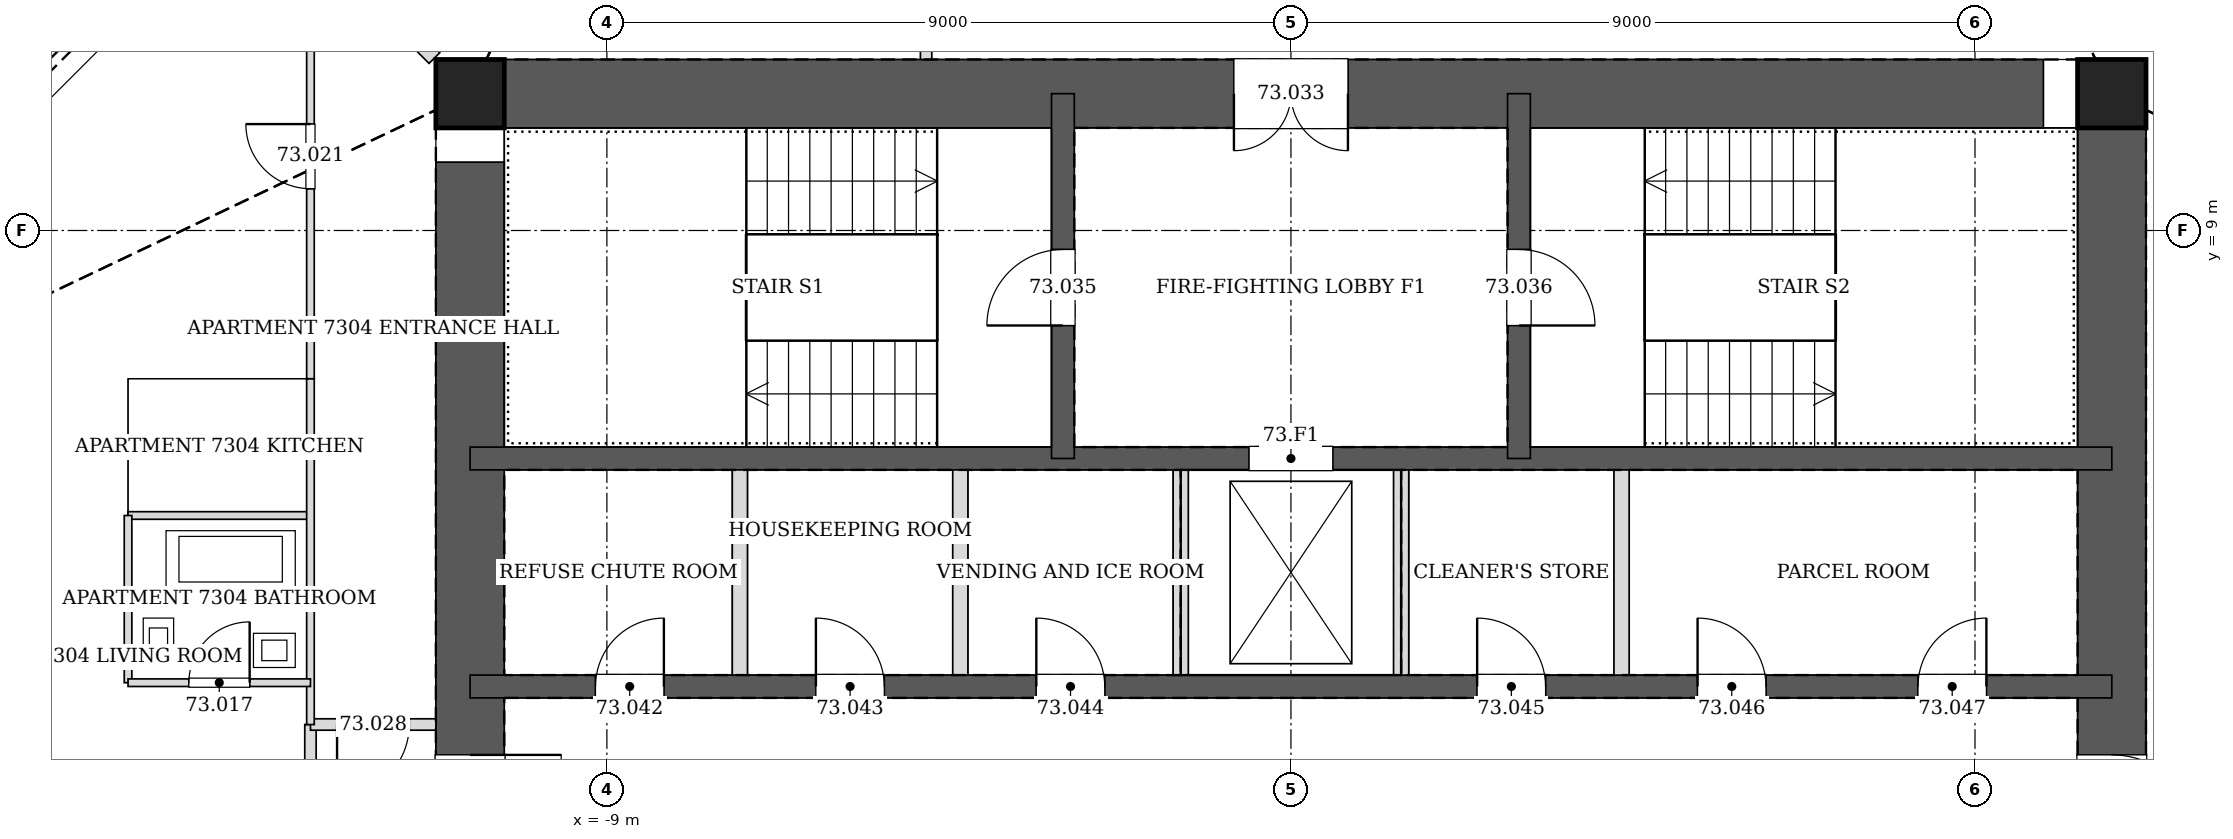
"""IFC4 building model, lengths in metres.
Left out: names, types, materials, properties, quantities, classifications, styles, units other than length and angle.
Written with IfcOpenShell. Run it as: python <this file> out.ifc"""

import sys

from ifc_helpers import new_model, si_unit, direction, frame, frame_2d, origin, origin_2d, place, context, subcontext, project, spatial, rectangle, hollow_rectangle, extrude, element, fill, save


model = new_model("IFC4")
c1 = context("Model", 3, precision=1e-05, world=origin(), true_north=direction((0.0, 1.0)))
c2 = subcontext(c1, "Body", "Model", "MODEL_VIEW")
j1 = project(units=[si_unit("LENGTHUNIT", "METRE"), si_unit("PLANEANGLEUNIT", "RADIAN")], contexts=[c1])
p1 = place(None, origin())
s1 = spatial("IfcSite", under=j1, at=p1, CompositionType="ELEMENT")
p2 = place(p1, origin())
s2 = spatial("IfcBuilding", under=s1, at=p2, CompositionType="ELEMENT")
p3 = place(p2, frame((0.0, 0.0, 298.0)))
s3 = spatial("IfcBuildingStorey", under=s2, at=p3, CompositionType="ELEMENT", Elevation=298.0)
for number, where, z_axis, x_axis in (
    (1, (10.8, 10.8, 0.0), (0.0, 0.0, 1.0), (1.0, 0.0, 0.0)),
    (2, (-10.8, 10.8, 0.0), (0.0, 0.0, 1.0), (1.0, 0.0, 0.0)),
):
    element("IfcColumn", number, at=place(p3, frame(where, z_axis=z_axis, x_axis=x_axis)), inside=s3, PredefinedType="COLUMN", context=c2, shape_type="SweptSolid", body=[
        extrude(hollow_rectangle(XDim=0.9, YDim=0.9, WallThickness=0.04, at=origin_2d()), origin(), (0.0, 0.0, 1.0), 3.4),
    ])
p4 = place(p3, frame((10.8, -10.8, 0.0), z_axis=(0.0, 0.0, 1.0), x_axis=(0.0, 1.0, 0.0)))
e3 = element("IfcWall", 3, at=p4, inside=s3, PredefinedType="SOLIDWALL", context=c2, shape_type="SweptSolid", body=[
    extrude(rectangle(XDim=21.6, YDim=0.9, at=frame_2d((10.8, 0.0))), origin(), (0.0, 0.0, 1.0), 3.4),
])
p5 = place(p4, frame((11.7, 0.0, 0.0)))
e4 = element("IfcOpeningElement", 4, at=p5, cuts=e3, PredefinedType="OPENING", context=c2, shape_type="SweptSolid", body=[
    extrude(rectangle(XDim=1.2, YDim=2.1, at=frame_2d((0.6, 1.05))), frame((0.0, 0.46, 0.0), z_axis=(0.0, -1.0, 0.0), x_axis=(1.0, 0.0, 0.0)), (0.0, 0.0, 1.0), 0.92),
])
p6 = place(p4, frame((8.7, 0.0, 0.0)))
e5 = element("IfcOpeningElement", 5, at=p6, cuts=e3, PredefinedType="OPENING", context=c2, shape_type="SweptSolid", body=[
    extrude(rectangle(XDim=1.2, YDim=2.1, at=frame_2d((0.6, 1.05))), frame((0.0, 0.46, 0.0), z_axis=(0.0, -1.0, 0.0), x_axis=(1.0, 0.0, 0.0)), (0.0, 0.0, 1.0), 0.92),
])
p7 = place(p3, frame((10.8, 10.8, 0.0), z_axis=(0.0, 0.0, 1.0), x_axis=(-1.0, 0.0, 0.0)))
e6 = element("IfcWall", 6, at=p7, inside=s3, PredefinedType="SOLIDWALL", context=c2, shape_type="SweptSolid", body=[
    extrude(rectangle(XDim=21.6, YDim=0.9, at=frame_2d((10.8, 0.0))), origin(), (0.0, 0.0, 1.0), 3.4),
])
p8 = place(p7, frame((10.05, 0.0, 0.0)))
e7 = element("IfcOpeningElement", 7, at=p8, cuts=e6, PredefinedType="OPENING", context=c2, shape_type="SweptSolid", body=[
    extrude(rectangle(XDim=1.5, YDim=2.1, at=frame_2d((0.75, 1.05))), frame((0.0, 0.46, 0.0), z_axis=(0.0, -1.0, 0.0), x_axis=(1.0, 0.0, 0.0)), (0.0, 0.0, 1.0), 0.92),
])
p9 = place(p3, frame((-10.8, 10.8, 0.0), z_axis=(0.0, 0.0, 1.0), x_axis=(0.0, -1.0, 0.0)))
e8 = element("IfcWall", 8, at=p9, inside=s3, PredefinedType="SOLIDWALL", context=c2, shape_type="SweptSolid", body=[
    extrude(rectangle(XDim=21.6, YDim=0.9, at=frame_2d((10.8, 0.0))), origin(), (0.0, 0.0, 1.0), 3.4),
])
p10 = place(p9, frame((8.7, 0.0, 0.0)))
e9 = element("IfcOpeningElement", 9, at=p10, cuts=e8, PredefinedType="OPENING", context=c2, shape_type="SweptSolid", body=[
    extrude(rectangle(XDim=1.2, YDim=2.1, at=frame_2d((0.6, 1.05))), frame((0.0, 0.46, 0.0), z_axis=(0.0, -1.0, 0.0), x_axis=(1.0, 0.0, 0.0)), (0.0, 0.0, 1.0), 0.92),
])
p11 = place(p9, frame((11.7, 0.0, 0.0)))
e10 = element("IfcOpeningElement", 10, at=p11, cuts=e8, PredefinedType="OPENING", context=c2, shape_type="SweptSolid", body=[
    extrude(rectangle(XDim=1.2, YDim=2.1, at=frame_2d((0.6, 1.05))), frame((0.0, 0.46, 0.0), z_axis=(0.0, -1.0, 0.0), x_axis=(1.0, 0.0, 0.0)), (0.0, 0.0, 1.0), 0.92),
])
p12 = place(p3, frame((-10.8, 3.0, 0.0), z_axis=(0.0, 0.0, 1.0), x_axis=(1.0, 0.0, 0.0)))
e11 = element("IfcWall", 11, at=p12, inside=s3, PredefinedType="SOLIDWALL", context=c2, shape_type="SweptSolid", body=[
    extrude(rectangle(XDim=21.6, YDim=0.3, at=frame_2d((10.8, 0.0))), origin(), (0.0, 0.0, 1.0), 3.4),
])
p13 = place(p12, frame((1.65, 0.0, 0.0)))
e12 = element("IfcOpeningElement", 12, at=p13, cuts=e11, PredefinedType="OPENING", context=c2, shape_type="SweptSolid", body=[
    extrude(rectangle(XDim=0.9, YDim=2.1, at=frame_2d((0.45, 1.05))), frame((0.0, 0.16, 0.0), z_axis=(0.0, -1.0, 0.0), x_axis=(1.0, 0.0, 0.0)), (0.0, 0.0, 1.0), 0.32),
])
p14 = place(p12, frame((4.55, 0.0, 0.0)))
e13 = element("IfcOpeningElement", 13, at=p14, cuts=e11, PredefinedType="OPENING", context=c2, shape_type="SweptSolid", body=[
    extrude(rectangle(XDim=0.9, YDim=2.1, at=frame_2d((0.45, 1.05))), frame((0.0, 0.16, 0.0), z_axis=(0.0, -1.0, 0.0), x_axis=(1.0, 0.0, 0.0)), (0.0, 0.0, 1.0), 0.32),
])
p15 = place(p12, frame((7.45, 0.0, 0.0)))
e14 = element("IfcOpeningElement", 14, at=p15, cuts=e11, PredefinedType="OPENING", context=c2, shape_type="SweptSolid", body=[
    extrude(rectangle(XDim=0.9, YDim=2.1, at=frame_2d((0.45, 1.05))), frame((0.0, 0.16, 0.0), z_axis=(0.0, -1.0, 0.0), x_axis=(1.0, 0.0, 0.0)), (0.0, 0.0, 1.0), 0.32),
])
p16 = place(p12, frame((13.25, 0.0, 0.0)))
e15 = element("IfcOpeningElement", 15, at=p16, cuts=e11, PredefinedType="OPENING", context=c2, shape_type="SweptSolid", body=[
    extrude(rectangle(XDim=0.9, YDim=2.1, at=frame_2d((0.45, 1.05))), frame((0.0, 0.16, 0.0), z_axis=(0.0, -1.0, 0.0), x_axis=(1.0, 0.0, 0.0)), (0.0, 0.0, 1.0), 0.32),
])
p17 = place(p12, frame((16.15, 0.0, 0.0)))
e16 = element("IfcOpeningElement", 16, at=p17, cuts=e11, PredefinedType="OPENING", context=c2, shape_type="SweptSolid", body=[
    extrude(rectangle(XDim=0.9, YDim=2.1, at=frame_2d((0.45, 1.05))), frame((0.0, 0.16, 0.0), z_axis=(0.0, -1.0, 0.0), x_axis=(1.0, 0.0, 0.0)), (0.0, 0.0, 1.0), 0.32),
])
p18 = place(p12, frame((19.05, 0.0, 0.0)))
e17 = element("IfcOpeningElement", 17, at=p18, cuts=e11, PredefinedType="OPENING", context=c2, shape_type="SweptSolid", body=[
    extrude(rectangle(XDim=0.9, YDim=2.1, at=frame_2d((0.45, 1.05))), frame((0.0, 0.16, 0.0), z_axis=(0.0, -1.0, 0.0), x_axis=(1.0, 0.0, 0.0)), (0.0, 0.0, 1.0), 0.32),
])
p19 = place(p3, frame((-10.8, 6.0, 0.0), z_axis=(0.0, 0.0, 1.0), x_axis=(1.0, 0.0, 0.0)))
e18 = element("IfcWall", 18, at=p19, inside=s3, PredefinedType="SOLIDWALL", context=c2, shape_type="SweptSolid", body=[
    extrude(rectangle(XDim=21.6, YDim=0.3, at=frame_2d((10.8, 0.0))), origin(), (0.0, 0.0, 1.0), 3.4),
])
p20 = place(p19, frame((10.25, 0.0, 0.0)))
e19 = element("IfcOpeningElement", 19, at=p20, cuts=e18, PredefinedType="OPENING", context=c2, shape_type="SweptSolid", body=[
    extrude(rectangle(XDim=1.1, YDim=2.1, at=frame_2d((0.55, 1.05))), frame((0.0, 0.16, 0.0), z_axis=(0.0, -1.0, 0.0), x_axis=(1.0, 0.0, 0.0)), (0.0, 0.0, 1.0), 0.32),
])
p21 = place(p3, frame((-3.0, 6.0, 0.0), z_axis=(0.0, 0.0, 1.0), x_axis=(0.0, 1.0, 0.0)))
e20 = element("IfcWall", 20, at=p21, inside=s3, PredefinedType="SOLIDWALL", context=c2, shape_type="SweptSolid", body=[
    extrude(rectangle(XDim=4.8, YDim=0.3, at=frame_2d((2.4, 0.0))), origin(), (0.0, 0.0, 1.0), 3.4),
])
p22 = place(p21, frame((1.75, 0.0, 0.0)))
e21 = element("IfcOpeningElement", 21, at=p22, cuts=e20, PredefinedType="OPENING", context=c2, shape_type="SweptSolid", body=[
    extrude(rectangle(XDim=1.0, YDim=2.1, at=frame_2d((0.5, 1.05))), frame((0.0, 0.16, 0.0), z_axis=(0.0, -1.0, 0.0), x_axis=(1.0, 0.0, 0.0)), (0.0, 0.0, 1.0), 0.32),
])
p23 = place(p3, frame((3.0, 6.0, 0.0), z_axis=(0.0, 0.0, 1.0), x_axis=(0.0, 1.0, 0.0)))
e22 = element("IfcWall", 22, at=p23, inside=s3, PredefinedType="SOLIDWALL", context=c2, shape_type="SweptSolid", body=[
    extrude(rectangle(XDim=4.8, YDim=0.3, at=frame_2d((2.4, 0.0))), origin(), (0.0, 0.0, 1.0), 3.4),
])
p24 = place(p23, frame((1.75, 0.0, 0.0)))
e23 = element("IfcOpeningElement", 23, at=p24, cuts=e22, PredefinedType="OPENING", context=c2, shape_type="SweptSolid", body=[
    extrude(rectangle(XDim=1.0, YDim=2.1, at=frame_2d((0.5, 1.05))), frame((0.0, 0.16, 0.0), z_axis=(0.0, -1.0, 0.0), x_axis=(1.0, 0.0, 0.0)), (0.0, 0.0, 1.0), 0.32),
])
p25 = place(p3, frame((-4.8, 12.9, 0.0), z_axis=(0.0, 0.0, 1.0), x_axis=(0.0, -1.0, 0.0)))
e24 = element("IfcWall", 24, at=p25, inside=s3, PredefinedType="PARTITIONING", context=c2, shape_type="SweptSolid", body=[
    extrude(rectangle(XDim=1.65, YDim=0.15, at=frame_2d((0.825, 0.0))), origin(), (0.0, 0.0, 1.0), 3.2),
])
p26 = place(p3, frame((-12.9, 2.5, 0.0), z_axis=(0.0, 0.0, 1.0), x_axis=(0.0, -1.0, 0.0)))
e25 = element("IfcWall", 25, at=p26, inside=s3, PredefinedType="PARTITIONING", context=c2, shape_type="SweptSolid", body=[
    extrude(rectangle(XDim=9.251, YDim=0.15, at=frame_2d((4.625, 0.0))), origin(), (0.0, 0.0, 1.0), 2.349),
])
p27 = place(p3, frame((-11.25, 2.5, 0.0), z_axis=(0.0, 0.0, 1.0), x_axis=(-1.0, 0.0, 0.0)))
e26 = element("IfcWall", 26, at=p27, inside=s3, PredefinedType="PARTITIONING", context=c2, shape_type="SweptSolid", body=[
    extrude(rectangle(XDim=1.65, YDim=0.15, at=frame_2d((0.825, 0.0))), origin(), (0.0, 0.0, 1.0), 3.2),
])
p28 = place(p27, frame((0.35, 0.0, 0.0)))
e27 = element("IfcOpeningElement", 27, at=p28, cuts=e26, PredefinedType="OPENING", context=c2, shape_type="SweptSolid", body=[
    extrude(rectangle(XDim=0.95, YDim=2.1, at=frame_2d((0.475, 1.05))), frame((0.0, 0.085, 0.0), z_axis=(0.0, -1.0, 0.0), x_axis=(1.0, 0.0, 0.0)), (0.0, 0.0, 1.0), 0.17),
])
p29 = place(p3, frame((-12.901, 12.901, 0.0), z_axis=(0.0, 0.0, 1.0), x_axis=(0.707106781187, -0.707106781187, 0.0)))
e28 = element("IfcWall", 28, at=p29, inside=s3, PredefinedType="PARTITIONING", context=c2, shape_type="SweptSolid", body=[
    extrude(rectangle(XDim=2.308, YDim=0.2, at=frame_2d((1.154, 0.0))), origin(), (0.0, 0.0, 1.0), 2.591),
])
p30 = place(p3, frame((-15.3, 5.25, 0.0), z_axis=(0.0, 0.0, 1.0), x_axis=(1.0, 0.0, 0.0)))
e29 = element("IfcWall", 29, at=p30, inside=s3, PredefinedType="PARTITIONING", context=c2, shape_type="SweptSolid", body=[
    extrude(rectangle(XDim=2.4, YDim=0.1, at=frame_2d((1.2, 0.0))), origin(), (0.0, 0.0, 1.0), 2.662),
])
p31 = place(p3, frame((-12.9, 7.05, 0.0), z_axis=(0.0, 0.0, 1.0), x_axis=(0.0, -1.0, 0.0)))
e30 = element("IfcWall", 30, at=p31, inside=s3, PredefinedType="PARTITIONING", context=c2, shape_type="SweptSolid", body=[
    extrude(rectangle(XDim=4.551, YDim=0.1, at=frame_2d((2.275, 0.0))), origin(), (0.0, 0.0, 1.0), 3.2),
])
p32 = place(p3, frame((-15.3, 5.25, 0.0), z_axis=(0.0, 0.0, 1.0), x_axis=(0.0, -1.0, 0.0)))
e31 = element("IfcWall", 31, at=p32, inside=s3, PredefinedType="PARTITIONING", context=c2, shape_type="SweptSolid", body=[
    extrude(rectangle(XDim=2.2, YDim=0.1, at=frame_2d((1.1, 0.0))), origin(), (0.0, 0.0, 1.0), 3.2),
])
p33 = place(p3, frame((-15.3, 3.05, 0.0), z_axis=(0.0, 0.0, 1.0), x_axis=(1.0, 0.0, 0.0)))
e32 = element("IfcWall", 32, at=p33, inside=s3, PredefinedType="PARTITIONING", context=c2, shape_type="SweptSolid", body=[
    extrude(rectangle(XDim=2.4, YDim=0.1, at=frame_2d((1.2, 0.0))), origin(), (0.0, 0.0, 1.0), 2.662),
])
p34 = place(p33, frame((0.8, 0.0, 0.0)))
e33 = element("IfcOpeningElement", 33, at=p34, cuts=e32, PredefinedType="OPENING", context=c2, shape_type="SweptSolid", body=[
    extrude(rectangle(XDim=0.8, YDim=2.1, at=frame_2d((0.4, 1.05))), frame((0.0, 0.06, 0.0), z_axis=(0.0, -1.0, 0.0), x_axis=(1.0, 0.0, 0.0)), (0.0, 0.0, 1.0), 0.12),
])
p35 = place(p3, frame((-12.9, 7.05, 0.0), z_axis=(0.0, 0.0, 1.0), x_axis=(0.0, 1.0, 0.0)))
e34 = element("IfcWall", 34, at=p35, inside=s3, PredefinedType="PARTITIONING", context=c2, shape_type="SweptSolid", body=[
    extrude(rectangle(XDim=5.85, YDim=0.1, at=frame_2d((2.925, 0.0))), origin(), (0.0, 0.0, 1.0), 2.436),
])
p36 = place(p35, frame((2.5, 0.0, 0.0)))
e35 = element("IfcOpeningElement", 35, at=p36, cuts=e34, PredefinedType="OPENING", context=c2, shape_type="SweptSolid", body=[
    extrude(rectangle(XDim=0.85, YDim=2.1, at=frame_2d((0.425, 1.05))), frame((0.0, 0.06, 0.0), z_axis=(0.0, -1.0, 0.0), x_axis=(1.0, 0.0, 0.0)), (0.0, 0.0, 1.0), 0.12),
])
for number, where, z_axis, x_axis in (
    (36, (-7.25, 3.15, 0.0), (0.0, 0.0, 1.0), (0.0, 1.0, 0.0)),
    (37, (-4.35, 3.15, 0.0), (0.0, 0.0, 1.0), (0.0, 1.0, 0.0)),
    (38, (-1.45, 3.15, 0.0), (0.0, 0.0, 1.0), (0.0, 1.0, 0.0)),
    (39, (1.45, 3.15, 0.0), (0.0, 0.0, 1.0), (0.0, 1.0, 0.0)),
    (40, (4.35, 3.15, 0.0), (0.0, 0.0, 1.0), (0.0, 1.0, 0.0)),
):
    element("IfcWall", number, at=place(p3, frame(where, z_axis=z_axis, x_axis=x_axis)), inside=s3, PredefinedType="PARTITIONING", context=c2, shape_type="SweptSolid", body=[
        extrude(rectangle(XDim=2.7, YDim=0.2, at=frame_2d((1.35, 0.0))), origin(), (0.0, 0.0, 1.0), 3.2),
    ])
p37 = place(p34, origin())
e41 = element("IfcDoor", 41, at=p37, inside=s3, OperationType="SINGLE_SWING_RIGHT", PredefinedType="DOOR", context=c2, shape_type="SweptSolid", body=[
    extrude(rectangle(XDim=0.8, YDim=2.1, at=frame_2d((0.4, 1.05))), frame((0.0, 0.025, 0.0), z_axis=(0.0, -1.0, 0.0), x_axis=(1.0, 0.0, 0.0)), (0.0, 0.0, 1.0), 0.05),
])
fill(e33, e41)
p38 = place(p36, origin())
e42 = element("IfcDoor", 42, at=p38, inside=s3, OperationType="SINGLE_SWING_RIGHT", PredefinedType="DOOR", context=c2, shape_type="SweptSolid", body=[
    extrude(rectangle(XDim=0.85, YDim=2.1, at=frame_2d((0.425, 1.05))), frame((0.0, 0.025, 0.0), z_axis=(0.0, -1.0, 0.0), x_axis=(1.0, 0.0, 0.0)), (0.0, 0.0, 1.0), 0.05),
])
fill(e35, e42)
p39 = place(p28, origin())
e43 = element("IfcDoor", 43, at=p39, inside=s3, OperationType="SINGLE_SWING_RIGHT", PredefinedType="DOOR", context=c2, shape_type="SweptSolid", body=[
    extrude(rectangle(XDim=0.95, YDim=2.1, at=frame_2d((0.475, 1.05))), frame((0.0, 0.025, 0.0), z_axis=(0.0, -1.0, 0.0), x_axis=(1.0, 0.0, 0.0)), (0.0, 0.0, 1.0), 0.05),
])
fill(e27, e43)
p40 = place(p5, frame((1.2, 0.0, 0.0), z_axis=(0.0, 0.0, 1.0), x_axis=(-1.0, 0.0, 0.0)))
e44 = element("IfcDoor", 44, at=p40, inside=s3, OperationType="SINGLE_SWING_RIGHT", PredefinedType="DOOR", context=c2, shape_type="SweptSolid", body=[
    extrude(rectangle(XDim=1.2, YDim=2.1, at=frame_2d((0.6, 1.05))), frame((0.0, 0.025, 0.0), z_axis=(0.0, -1.0, 0.0), x_axis=(1.0, 0.0, 0.0)), (0.0, 0.0, 1.0), 0.05),
])
fill(e4, e44)
p41 = place(p10, origin())
e45 = element("IfcDoor", 45, at=p41, inside=s3, OperationType="SINGLE_SWING_LEFT", PredefinedType="DOOR", context=c2, shape_type="SweptSolid", body=[
    extrude(rectangle(XDim=1.2, YDim=2.1, at=frame_2d((0.6, 1.05))), frame((0.0, 0.025, 0.0), z_axis=(0.0, -1.0, 0.0), x_axis=(1.0, 0.0, 0.0)), (0.0, 0.0, 1.0), 0.05),
])
fill(e9, e45)
p42 = place(p8, origin())
e46 = element("IfcDoor", 46, at=p42, inside=s3, OperationType="DOUBLE_DOOR_SINGLE_SWING", PredefinedType="DOOR", context=c2, shape_type="SweptSolid", body=[
    extrude(rectangle(XDim=1.5, YDim=2.1, at=frame_2d((0.75, 1.05))), frame((0.0, 0.025, 0.0), z_axis=(0.0, -1.0, 0.0), x_axis=(1.0, 0.0, 0.0)), (0.0, 0.0, 1.0), 0.05),
])
fill(e7, e46)
p43 = place(p22, origin())
e47 = element("IfcDoor", 47, at=p43, inside=s3, OperationType="SINGLE_SWING_LEFT", PredefinedType="DOOR", context=c2, shape_type="SweptSolid", body=[
    extrude(rectangle(XDim=1.0, YDim=2.1, at=frame_2d((0.5, 1.05))), frame((0.0, 0.025, 0.0), z_axis=(0.0, -1.0, 0.0), x_axis=(1.0, 0.0, 0.0)), (0.0, 0.0, 1.0), 0.05),
])
fill(e21, e47)
p44 = place(p24, frame((1.0, 0.0, 0.0), z_axis=(0.0, 0.0, 1.0), x_axis=(-1.0, 0.0, 0.0)))
e48 = element("IfcDoor", 48, at=p44, inside=s3, OperationType="SINGLE_SWING_RIGHT", PredefinedType="DOOR", context=c2, shape_type="SweptSolid", body=[
    extrude(rectangle(XDim=1.0, YDim=2.1, at=frame_2d((0.5, 1.05))), frame((0.0, 0.025, 0.0), z_axis=(0.0, -1.0, 0.0), x_axis=(1.0, 0.0, 0.0)), (0.0, 0.0, 1.0), 0.05),
])
fill(e23, e48)
p45 = place(p13, origin())
e49 = element("IfcDoor", 49, at=p45, inside=s3, OperationType="SINGLE_SWING_RIGHT", PredefinedType="DOOR", context=c2, shape_type="SweptSolid", body=[
    extrude(rectangle(XDim=0.9, YDim=2.1, at=frame_2d((0.45, 1.05))), frame((0.0, 0.025, 0.0), z_axis=(0.0, -1.0, 0.0), x_axis=(1.0, 0.0, 0.0)), (0.0, 0.0, 1.0), 0.05),
])
fill(e12, e49)
p46 = place(p14, origin())
e50 = element("IfcDoor", 50, at=p46, inside=s3, OperationType="SINGLE_SWING_LEFT", PredefinedType="DOOR", context=c2, shape_type="SweptSolid", body=[
    extrude(rectangle(XDim=0.9, YDim=2.1, at=frame_2d((0.45, 1.05))), frame((0.0, 0.025, 0.0), z_axis=(0.0, -1.0, 0.0), x_axis=(1.0, 0.0, 0.0)), (0.0, 0.0, 1.0), 0.05),
])
fill(e13, e50)
p47 = place(p15, origin())
e51 = element("IfcDoor", 51, at=p47, inside=s3, OperationType="SINGLE_SWING_LEFT", PredefinedType="DOOR", context=c2, shape_type="SweptSolid", body=[
    extrude(rectangle(XDim=0.9, YDim=2.1, at=frame_2d((0.45, 1.05))), frame((0.0, 0.025, 0.0), z_axis=(0.0, -1.0, 0.0), x_axis=(1.0, 0.0, 0.0)), (0.0, 0.0, 1.0), 0.05),
])
fill(e14, e51)
p48 = place(p16, origin())
e52 = element("IfcDoor", 52, at=p48, inside=s3, OperationType="SINGLE_SWING_LEFT", PredefinedType="DOOR", context=c2, shape_type="SweptSolid", body=[
    extrude(rectangle(XDim=0.9, YDim=2.1, at=frame_2d((0.45, 1.05))), frame((0.0, 0.025, 0.0), z_axis=(0.0, -1.0, 0.0), x_axis=(1.0, 0.0, 0.0)), (0.0, 0.0, 1.0), 0.05),
])
fill(e15, e52)
p49 = place(p17, origin())
e53 = element("IfcDoor", 53, at=p49, inside=s3, OperationType="SINGLE_SWING_LEFT", PredefinedType="DOOR", context=c2, shape_type="SweptSolid", body=[
    extrude(rectangle(XDim=0.9, YDim=2.1, at=frame_2d((0.45, 1.05))), frame((0.0, 0.025, 0.0), z_axis=(0.0, -1.0, 0.0), x_axis=(1.0, 0.0, 0.0)), (0.0, 0.0, 1.0), 0.05),
])
fill(e16, e53)
p50 = place(p18, origin())
e54 = element("IfcDoor", 54, at=p50, inside=s3, OperationType="SINGLE_SWING_RIGHT", PredefinedType="DOOR", context=c2, shape_type="SweptSolid", body=[
    extrude(rectangle(XDim=0.9, YDim=2.1, at=frame_2d((0.45, 1.05))), frame((0.0, 0.025, 0.0), z_axis=(0.0, -1.0, 0.0), x_axis=(1.0, 0.0, 0.0)), (0.0, 0.0, 1.0), 0.05),
])
fill(e17, e54)
p51 = place(p20, origin())
e55 = element("IfcDoor", 55, at=p51, inside=s3, OperationType="DOUBLE_DOOR_SLIDING", PredefinedType="DOOR", context=c2, shape_type="SweptSolid", body=[
    extrude(rectangle(XDim=1.1, YDim=2.1, at=frame_2d((0.55, 1.05))), frame((0.0, 0.025, 0.0), z_axis=(0.0, -1.0, 0.0), x_axis=(1.0, 0.0, 0.0)), (0.0, 0.0, 1.0), 0.05),
])
fill(e19, e55)
save(model, sys.argv[1])
